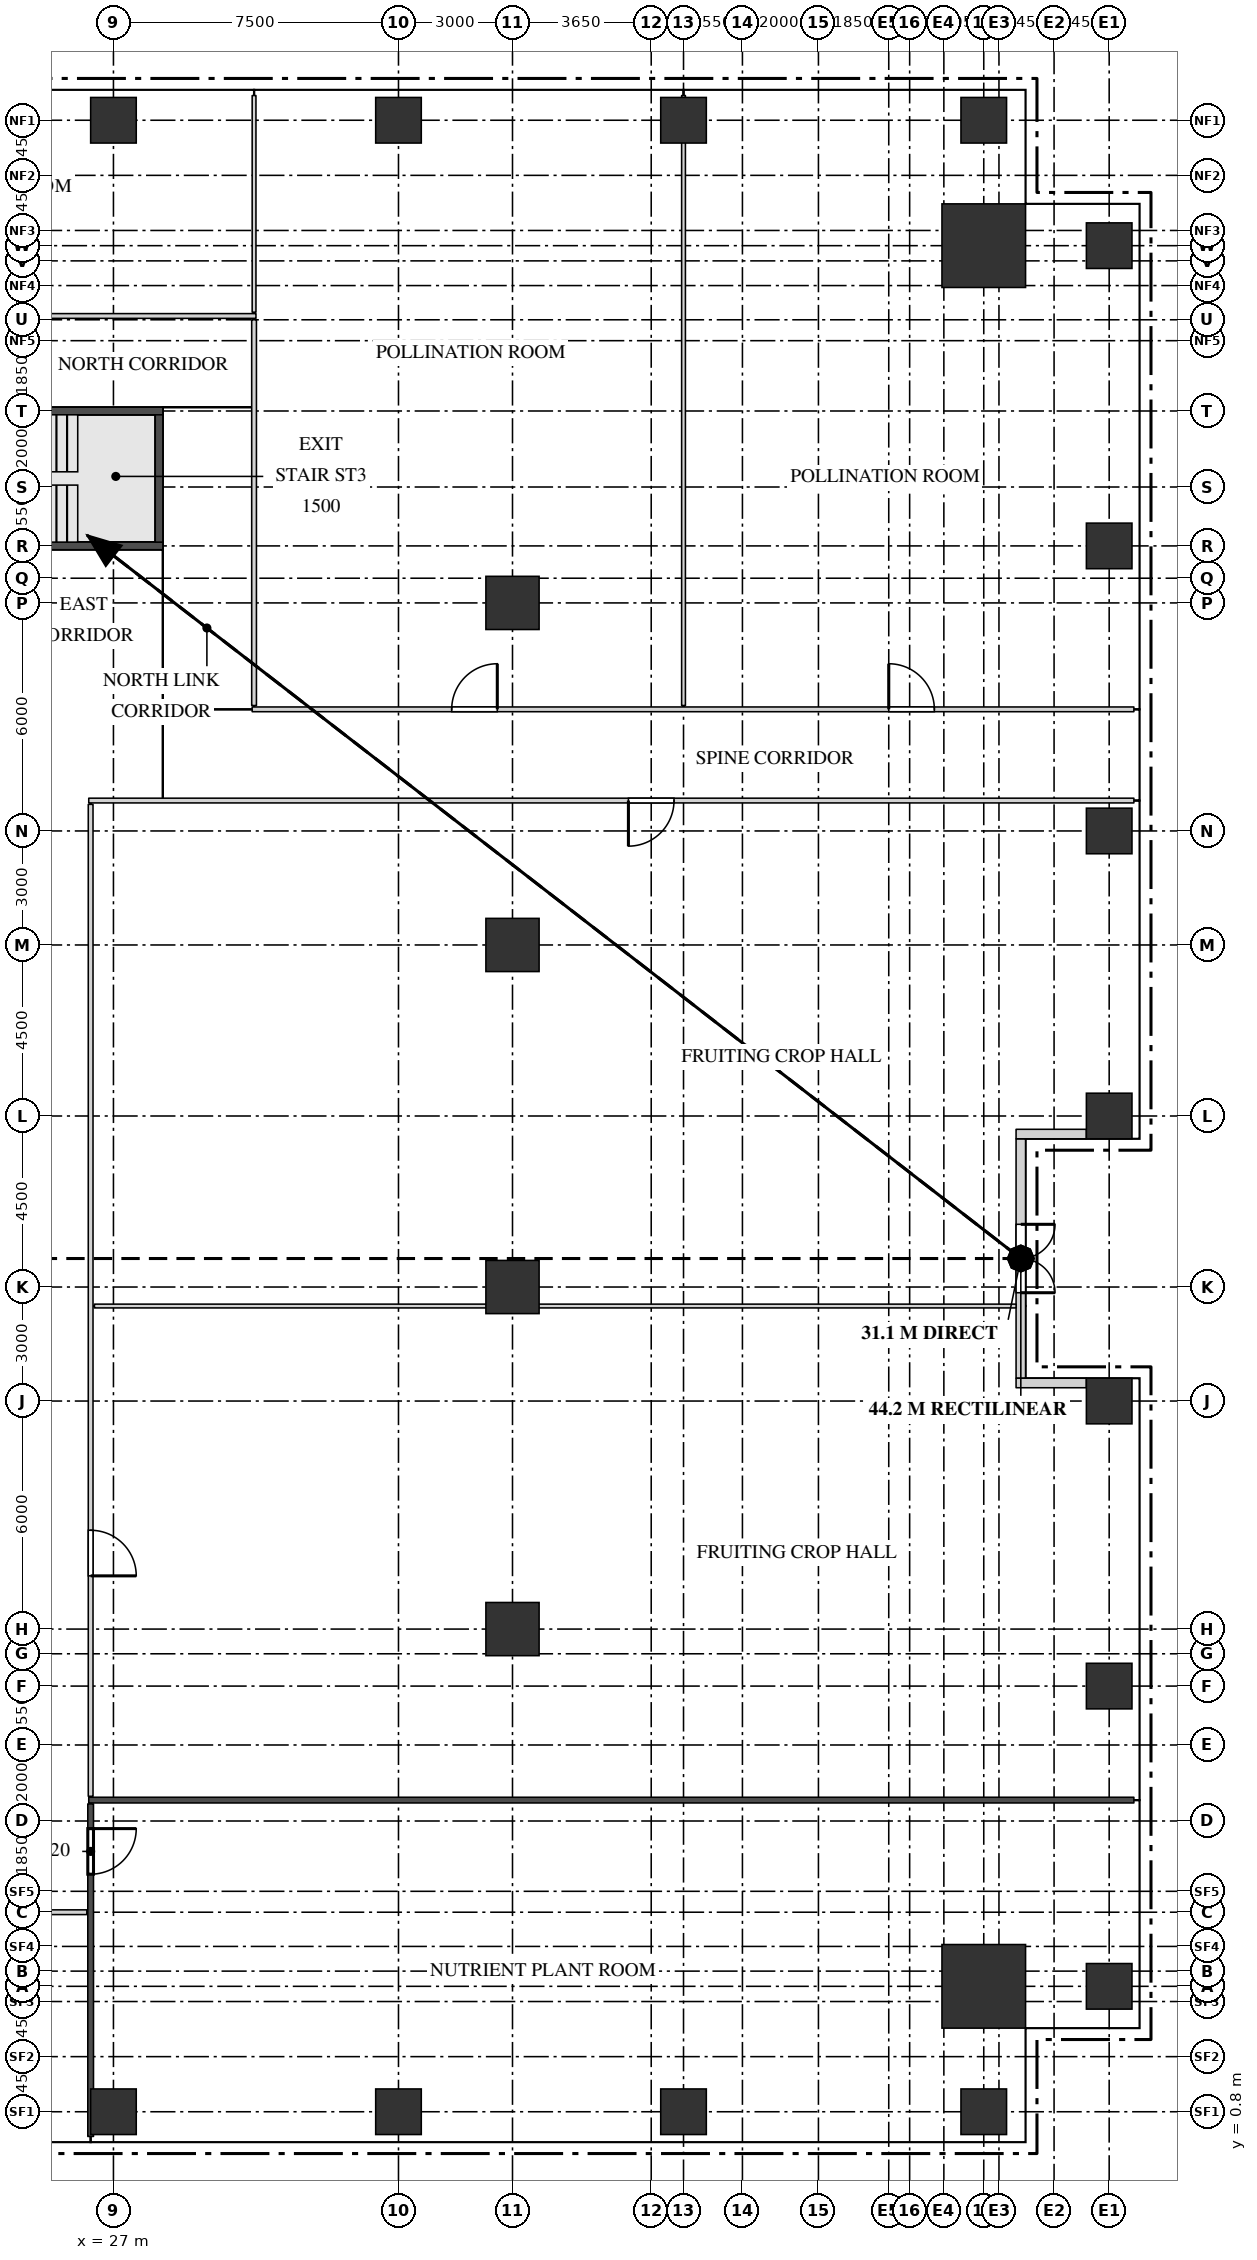
"""IFC4 building model, lengths in metres.
Left out: names, types, materials, properties, quantities, classifications, styles, units other than length and angle.
Written with IfcOpenShell. Run it as: python <this file> out.ifc"""

import sys

from ifc_helpers import new_model, si_unit, direction, frame, frame_2d, origin, origin_2d, place, context, subcontext, project, spatial, rectangle, extrude, source, transform, mapped, element, fill, save


model = new_model("IFC4")
c1 = context("Model", 3, precision=1e-05, world=origin(), true_north=direction((0.0, 1.0)))
c2 = subcontext(c1, "Body", "Model", "MODEL_VIEW")
j1 = project(units=[si_unit("LENGTHUNIT", "METRE"), si_unit("PLANEANGLEUNIT", "RADIAN")], contexts=[c1])
p1 = place(None, origin())
s1 = spatial("IfcSite", under=j1, at=p1, CompositionType="ELEMENT")
p2 = place(p1, origin())
s2 = spatial("IfcBuilding", under=s1, at=p2, CompositionType="ELEMENT")
p3 = place(p2, frame((0.0, 0.0, 73.5)))
s3 = spatial("IfcBuildingStorey", under=s2, at=p3, CompositionType="ELEMENT", Elevation=73.5)
m1 = source(origin(), c2, "Body", "SweptSolid", [
    extrude(rectangle(XDim=7.1, YDim=0.2, at=frame_2d((3.55, 0.0))), origin(), (0.0, 0.0, 1.0), 4.2),
])
p4 = place(p3, frame((21.2, 45.55, 0.0), z_axis=(0.0, 0.0, 1.0), x_axis=(1.0, 0.0, 0.0)))
e1 = element("IfcWall", 1, at=p4, inside=s3, PredefinedType="SHEAR", context=c2, shape_type="MappedRepresentation", body=[
    mapped(m1, transform((0.0, 0.0, 0.0))),
])
m2 = source(origin(), c2, "Body", "SweptSolid", [
    extrude(rectangle(XDim=1.2, YDim=2.1, at=frame_2d((0.6, 1.05))), frame((0.0, 0.11, 0.0), z_axis=(0.0, -1.0, 0.0), x_axis=(1.0, 0.0, 0.0)), (0.0, 0.0, 1.0), 0.22),
])
p5 = place(p4, frame((0.15, 0.0, 0.0)))
e2 = element("IfcOpeningElement", 2, at=p5, cuts=e1, PredefinedType="OPENING", context=c2, shape_type="MappedRepresentation", body=[
    mapped(m2, transform((0.0, 0.0, 0.0))),
])
p6 = place(p3, frame((21.2, 42.0, 0.0), z_axis=(0.0, 0.0, 1.0), x_axis=(1.0, 0.0, 0.0)))
e3 = element("IfcWall", 3, at=p6, inside=s3, PredefinedType="SHEAR", context=c2, shape_type="MappedRepresentation", body=[
    mapped(m1, transform((0.0, 0.0, 0.0))),
])
m3 = source(origin(), c2, "Body", "SweptSolid", [
    extrude(rectangle(XDim=3.35, YDim=0.2, at=frame_2d((1.675, 0.0))), origin(), (0.0, 0.0, 1.0), 4.2),
])
p7 = place(p3, frame((28.2, 42.1, 0.0), z_axis=(0.0, 0.0, 1.0), x_axis=(0.0, 1.0, 0.0)))
e4 = element("IfcWall", 4, at=p7, inside=s3, PredefinedType="SHEAR", context=c2, shape_type="MappedRepresentation", body=[
    mapped(m3, transform((0.0, 0.0, 0.0))),
])
m4 = source(origin(), c2, "Body", "SweptSolid", [
    extrude(rectangle(XDim=2.2, YDim=2.2, at=origin_2d()), origin(), (0.0, 0.0, 1.0), 4.5),
])
for number, where, z_axis, x_axis in (
    (5, (49.9, 49.9, 0.0), (0.0, 0.0, 1.0), (1.0, 0.0, 0.0)),
    (6, (49.9, 4.1, 0.0), (0.0, 0.0, 1.0), (1.0, 0.0, 0.0)),
):
    element("IfcColumn", number, at=place(p3, frame(where, z_axis=z_axis, x_axis=x_axis)), inside=s3, PredefinedType="COLUMN", context=c2, shape_type="MappedRepresentation", body=[
        mapped(m4, transform((0.0, 0.0, 0.0))),
    ])
m5 = source(origin(), c2, "Body", "SweptSolid", [
    extrude(rectangle(XDim=1.2, YDim=1.2, at=origin_2d()), origin(), (0.0, 0.0, 1.0), 4.2),
])
for number, where, z_axis, x_axis in (
    (7, (27.0, 0.8, 0.0), (0.0, 0.0, 1.0), (1.0, 0.0, 0.0)),
    (8, (34.5, 0.8, 0.0), (0.0, 0.0, 1.0), (1.0, 0.0, 0.0)),
    (9, (42.0, 0.8, 0.0), (0.0, 0.0, 1.0), (1.0, 0.0, 0.0)),
    (10, (49.9, 0.8, 0.0), (0.0, 0.0, 1.0), (1.0, 0.0, 0.0)),
    (11, (53.2, 4.1, 0.0), (0.0, 0.0, 1.0), (1.0, 0.0, 0.0)),
    (12, (53.2, 12.0, 0.0), (0.0, 0.0, 1.0), (1.0, 0.0, 0.0)),
    (13, (53.2, 19.5, 0.0), (0.0, 0.0, 1.0), (1.0, 0.0, 0.0)),
    (14, (53.2, 27.0, 0.0), (0.0, 0.0, 1.0), (1.0, 0.0, 0.0)),
    (15, (53.2, 34.5, 0.0), (0.0, 0.0, 1.0), (1.0, 0.0, 0.0)),
    (16, (53.2, 42.0, 0.0), (0.0, 0.0, 1.0), (1.0, 0.0, 0.0)),
    (17, (53.2, 49.9, 0.0), (0.0, 0.0, 1.0), (1.0, 0.0, 0.0)),
    (18, (27.0, 53.2, 0.0), (0.0, 0.0, 1.0), (1.0, 0.0, 0.0)),
    (19, (34.5, 53.2, 0.0), (0.0, 0.0, 1.0), (1.0, 0.0, 0.0)),
    (20, (42.0, 53.2, 0.0), (0.0, 0.0, 1.0), (1.0, 0.0, 0.0)),
    (21, (49.9, 53.2, 0.0), (0.0, 0.0, 1.0), (1.0, 0.0, 0.0)),
):
    element("IfcColumn", number, at=place(p3, frame(where, z_axis=z_axis, x_axis=x_axis)), inside=s3, PredefinedType="COLUMN", context=c2, shape_type="MappedRepresentation", body=[
        mapped(m5, transform((0.0, 0.0, 0.0))),
    ])
m6 = source(origin(), c2, "Body", "SweptSolid", [
    extrude(rectangle(XDim=1.4, YDim=1.4, at=origin_2d()), origin(), (0.0, 0.0, 1.0), 4.2),
])
for number, where, z_axis, x_axis in (
    (22, (37.5, 13.5, 0.0), (0.0, 0.0, 1.0), (1.0, 0.0, 0.0)),
    (23, (37.5, 22.5, 0.0), (0.0, 0.0, 1.0), (1.0, 0.0, 0.0)),
    (24, (37.5, 31.5, 0.0), (0.0, 0.0, 1.0), (1.0, 0.0, 0.0)),
    (25, (37.5, 40.5, 0.0), (0.0, 0.0, 1.0), (1.0, 0.0, 0.0)),
):
    element("IfcColumn", number, at=place(p3, frame(where, z_axis=z_axis, x_axis=x_axis)), inside=s3, PredefinedType="COLUMN", context=c2, shape_type="MappedRepresentation", body=[
        mapped(m6, transform((0.0, 0.0, 0.0))),
    ])
m7 = source(origin(), c2, "Body", "SweptSolid", [
    extrude(rectangle(XDim=6.3, YDim=0.25, at=frame_2d((3.15, 0.0))), origin(), (0.0, 0.0, 1.0), 3.6),
])
p8 = place(p3, frame((50.875, 20.1, 0.0), z_axis=(0.0, 0.0, 1.0), x_axis=(0.0, 1.0, 0.0)))
e26 = element("IfcWall", 26, at=p8, inside=s3, PredefinedType="SOLIDWALL", context=c2, shape_type="MappedRepresentation", body=[
    mapped(m7, transform((0.0, 0.0, 0.0))),
])
m8 = source(origin(), c2, "Body", "SweptSolid", [
    extrude(rectangle(XDim=1.6, YDim=2.4, at=frame_2d((0.8, 1.2))), frame((0.0, 0.135, 0.0), z_axis=(0.0, -1.0, 0.0), x_axis=(1.0, 0.0, 0.0)), (0.0, 0.0, 1.0), 0.27),
])
p9 = place(p8, frame((0.35, 0.0, 0.0)))
e27 = element("IfcOpeningElement", 27, at=p9, cuts=e26, PredefinedType="OPENING", context=c2, shape_type="MappedRepresentation", body=[
    mapped(m8, transform((0.0, 0.0, 0.0))),
])
p10 = place(p8, frame((4.35, 0.0, 0.0)))
e28 = element("IfcOpeningElement", 28, at=p10, cuts=e26, PredefinedType="OPENING", context=c2, shape_type="MappedRepresentation", body=[
    mapped(m8, transform((0.0, 0.0, 0.0))),
])
m9 = source(origin(), c2, "Body", "SweptSolid", [
    extrude(rectangle(XDim=1.8, YDim=2.4, at=frame_2d((0.9, 1.2))), frame((0.0, 0.135, 0.0), z_axis=(0.0, -1.0, 0.0), x_axis=(1.0, 0.0, 0.0)), (0.0, 0.0, 1.0), 0.27),
])
p11 = place(p8, frame((2.25, 0.0, 0.0)))
e29 = element("IfcOpeningElement", 29, at=p11, cuts=e26, PredefinedType="OPENING", context=c2, shape_type="MappedRepresentation", body=[
    mapped(m9, transform((0.0, 0.0, 0.0))),
])
m10 = source(origin(), c2, "Body", "SweptSolid", [
    extrude(rectangle(XDim=1.85, YDim=0.25, at=frame_2d((0.925, 0.0))), origin(), (0.0, 0.0, 1.0), 3.6),
])
for number, where, z_axis, x_axis in (
    (30, (52.6, 19.975, 0.0), (0.0, 0.0, 1.0), (-1.0, 0.0, 0.0)),
    (31, (52.6, 26.525, 0.0), (0.0, 0.0, 1.0), (-1.0, 0.0, 0.0)),
):
    element("IfcWall", number, at=place(p3, frame(where, z_axis=z_axis, x_axis=x_axis)), inside=s3, PredefinedType="SOLIDWALL", context=c2, shape_type="MappedRepresentation", body=[
        mapped(m10, transform((0.0, 0.0, 0.0))),
    ])
m11 = source(origin(), c2, "Body", "SweptSolid", [
    extrude(rectangle(XDim=8.75, YDim=0.15, at=frame_2d((4.375, 0.0))), origin(), (0.0, 0.0, 1.0), 4.3),
])
p12 = place(p3, frame((26.4, 0.15, 0.0), z_axis=(0.0, 0.0, 1.0), x_axis=(0.0, 1.0, 0.0)))
e32 = element("IfcWall", 32, at=p12, inside=s3, PredefinedType="PARTITIONING", context=c2, shape_type="MappedRepresentation", body=[
    mapped(m11, transform((0.0, 0.0, 0.0))),
])
m12 = source(origin(), c2, "Body", "SweptSolid", [
    extrude(rectangle(XDim=1.2, YDim=2.1, at=frame_2d((0.6, 1.05))), frame((0.0, 0.085, 0.0), z_axis=(0.0, -1.0, 0.0), x_axis=(1.0, 0.0, 0.0)), (0.0, 0.0, 1.0), 0.17),
])
p13 = place(p12, frame((6.9, 0.0, 0.0)))
e33 = element("IfcOpeningElement", 33, at=p13, cuts=e32, PredefinedType="OPENING", context=c2, shape_type="MappedRepresentation", body=[
    mapped(m12, transform((0.0, 0.0, 0.0))),
])
m13 = source(origin(), c2, "Body", "SweptSolid", [
    extrude(rectangle(XDim=22.15, YDim=0.125, at=frame_2d((11.075, 0.0))), origin(), (0.0, 0.0, 1.0), 4.3),
])
p14 = place(p3, frame((4.15, 6.05, 0.0), z_axis=(0.0, 0.0, 1.0), x_axis=(1.0, 0.0, 0.0)))
e34 = element("IfcWall", 34, at=p14, inside=s3, PredefinedType="PARTITIONING", context=c2, shape_type="MappedRepresentation", body=[
    mapped(m13, transform((0.0, 0.0, 0.0))),
])
m14 = source(origin(), c2, "Body", "SweptSolid", [
    extrude(rectangle(XDim=1.2, YDim=2.1, at=frame_2d((0.6, 1.05))), frame((0.0, 0.073, 0.0), z_axis=(0.0, -1.0, 0.0), x_axis=(1.0, 0.0, 0.0)), (0.0, 0.0, 1.0), 0.145),
])
p15 = place(p14, frame((9.2, 0.0, 0.0)))
e35 = element("IfcOpeningElement", 35, at=p15, cuts=e34, PredefinedType="OPENING", context=c2, shape_type="MappedRepresentation", body=[
    mapped(m14, transform((0.0, 0.0, 0.0))),
])
m15 = source(origin(), c2, "Body", "SweptSolid", [
    extrude(rectangle(XDim=27.5, YDim=0.15, at=frame_2d((13.75, 0.0))), origin(), (0.0, 0.0, 1.0), 4.3),
])
p16 = place(p3, frame((26.35, 9.0, 0.0), z_axis=(0.0, 0.0, 1.0), x_axis=(1.0, 0.0, 0.0)))
e36 = element("IfcWall", 36, at=p16, inside=s3, PredefinedType="PARTITIONING", context=c2, shape_type="MappedRepresentation", body=[
    mapped(m15, transform((0.0, 0.0, 0.0))),
])
m16 = source(origin(), c2, "Body", "SweptSolid", [
    extrude(rectangle(XDim=26.1, YDim=0.125, at=frame_2d((13.05, 0.0))), origin(), (0.0, 0.0, 1.0), 4.3),
])
p17 = place(p3, frame((26.4, 9.1, 0.0), z_axis=(0.0, 0.0, 1.0), x_axis=(0.0, 1.0, 0.0)))
e37 = element("IfcWall", 37, at=p17, inside=s3, PredefinedType="PARTITIONING", context=c2, shape_type="MappedRepresentation", body=[
    mapped(m16, transform((0.0, 0.0, 0.0))),
])
p18 = place(p17, frame((5.8, 0.0, 0.0)))
e38 = element("IfcOpeningElement", 38, at=p18, cuts=e37, PredefinedType="OPENING", context=c2, shape_type="MappedRepresentation", body=[
    mapped(m14, transform((0.0, 0.0, 0.0))),
])
m17 = source(origin(), c2, "Body", "SweptSolid", [
    extrude(rectangle(XDim=24.25, YDim=0.1, at=frame_2d((12.125, 0.0))), origin(), (0.0, 0.0, 1.0), 4.3),
])
p19 = place(p3, frame((26.5, 22.0, 0.0), z_axis=(0.0, 0.0, 1.0), x_axis=(1.0, 0.0, 0.0)))
e39 = element("IfcWall", 39, at=p19, inside=s3, PredefinedType="PARTITIONING", context=c2, shape_type="MappedRepresentation", body=[
    mapped(m17, transform((0.0, 0.0, 0.0))),
])
m18 = source(origin(), c2, "Body", "SweptSolid", [
    extrude(rectangle(XDim=27.5, YDim=0.125, at=frame_2d((13.75, 0.0))), origin(), (0.0, 0.0, 1.0), 4.3),
])
p20 = place(p3, frame((26.35, 35.3, 0.0), z_axis=(0.0, 0.0, 1.0), x_axis=(1.0, 0.0, 0.0)))
e40 = element("IfcWall", 40, at=p20, inside=s3, PredefinedType="PARTITIONING", context=c2, shape_type="MappedRepresentation", body=[
    mapped(m18, transform((0.0, 0.0, 0.0))),
])
p21 = place(p20, frame((14.2, 0.0, 0.0)))
e41 = element("IfcOpeningElement", 41, at=p21, cuts=e40, PredefinedType="OPENING", context=c2, shape_type="MappedRepresentation", body=[
    mapped(m14, transform((0.0, 0.0, 0.0))),
])
m19 = source(origin(), c2, "Body", "SweptSolid", [
    extrude(rectangle(XDim=23.2, YDim=0.125, at=frame_2d((11.6, 0.0))), origin(), (0.0, 0.0, 1.0), 4.3),
])
p22 = place(p3, frame((30.65, 37.7, 0.0), z_axis=(0.0, 0.0, 1.0), x_axis=(1.0, 0.0, 0.0)))
e42 = element("IfcWall", 42, at=p22, inside=s3, PredefinedType="PARTITIONING", context=c2, shape_type="MappedRepresentation", body=[
    mapped(m19, transform((0.0, 0.0, 0.0))),
])
p23 = place(p22, frame((5.25, 0.0, 0.0)))
e43 = element("IfcOpeningElement", 43, at=p23, cuts=e42, PredefinedType="OPENING", context=c2, shape_type="MappedRepresentation", body=[
    mapped(m14, transform((0.0, 0.0, 0.0))),
])
p24 = place(p22, frame((16.75, 0.0, 0.0)))
e44 = element("IfcOpeningElement", 44, at=p24, cuts=e42, PredefinedType="OPENING", context=c2, shape_type="MappedRepresentation", body=[
    mapped(m14, transform((0.0, 0.0, 0.0))),
])
m20 = source(origin(), c2, "Body", "SweptSolid", [
    extrude(rectangle(XDim=10.15, YDim=0.125, at=frame_2d((5.075, 0.0))), origin(), (0.0, 0.0, 1.0), 4.3),
])
p25 = place(p3, frame((30.7, 37.8, 0.0), z_axis=(0.0, 0.0, 1.0), x_axis=(0.0, 1.0, 0.0)))
e45 = element("IfcWall", 45, at=p25, inside=s3, PredefinedType="PARTITIONING", context=c2, shape_type="MappedRepresentation", body=[
    mapped(m20, transform((0.0, 0.0, 0.0))),
])
m21 = source(origin(), c2, "Body", "SweptSolid", [
    extrude(rectangle(XDim=16.05, YDim=0.1, at=frame_2d((8.025, 0.0))), origin(), (0.0, 0.0, 1.0), 3.7),
])
p26 = place(p3, frame((42.0, 37.8, 0.0), z_axis=(0.0, 0.0, 1.0), x_axis=(0.0, 1.0, 0.0)))
e46 = element("IfcWall", 46, at=p26, inside=s3, PredefinedType="PARTITIONING", context=c2, shape_type="MappedRepresentation", body=[
    mapped(m21, transform((0.0, 0.0, 0.0))),
])
m22 = source(origin(), c2, "Body", "SweptSolid", [
    extrude(rectangle(XDim=18.8, YDim=0.125, at=frame_2d((9.4, 0.0))), origin(), (0.0, 0.0, 1.0), 4.3),
])
p27 = place(p3, frame((11.95, 48.05, 0.0), z_axis=(0.0, 0.0, 1.0), x_axis=(1.0, 0.0, 0.0)))
e47 = element("IfcWall", 47, at=p27, inside=s3, PredefinedType="PARTITIONING", context=c2, shape_type="MappedRepresentation", body=[
    mapped(m22, transform((0.0, 0.0, 0.0))),
])
p28 = place(p27, frame((8.8, 0.0, 0.0)))
e48 = element("IfcOpeningElement", 48, at=p28, cuts=e47, PredefinedType="OPENING", context=c2, shape_type="MappedRepresentation", body=[
    mapped(m14, transform((0.0, 0.0, 0.0))),
])
m23 = source(origin(), c2, "Body", "SweptSolid", [
    extrude(rectangle(XDim=5.7, YDim=0.1, at=frame_2d((2.85, 0.0))), origin(), (0.0, 0.0, 1.0), 4.3),
])
p29 = place(p3, frame((30.7, 48.15, 0.0), z_axis=(0.0, 0.0, 1.0), x_axis=(0.0, 1.0, 0.0)))
e49 = element("IfcWall", 49, at=p29, inside=s3, PredefinedType="PARTITIONING", context=c2, shape_type="MappedRepresentation", body=[
    mapped(m23, transform((0.0, 0.0, 0.0))),
])
m24 = source(origin(), c2, "Body", "SweptSolid", [
    extrude(rectangle(XDim=1.6, YDim=2.4, at=frame_2d((0.8, 1.2))), frame((0.0, 0.03, 0.0), z_axis=(0.0, -1.0, 0.0), x_axis=(1.0, 0.0, 0.0)), (0.0, 0.0, 1.0), 0.06),
])
p30 = place(p9, origin())
e50 = element("IfcWindow", 50, at=p30, inside=s3, PartitioningType="SINGLE_PANEL", PredefinedType="WINDOW", context=c2, shape_type="MappedRepresentation", body=[
    mapped(m24, transform((0.0, 0.0, 0.0))),
])
fill(e27, e50)
p31 = place(p10, origin())
e51 = element("IfcWindow", 51, at=p31, inside=s3, PartitioningType="SINGLE_PANEL", PredefinedType="WINDOW", context=c2, shape_type="MappedRepresentation", body=[
    mapped(m24, transform((0.0, 0.0, 0.0))),
])
fill(e28, e51)
m25 = source(origin(), c2, "Body", "SweptSolid", [
    extrude(rectangle(XDim=1.8, YDim=2.4, at=frame_2d((0.9, 1.2))), frame((0.0, 0.025, 0.0), z_axis=(0.0, -1.0, 0.0), x_axis=(1.0, 0.0, 0.0)), (0.0, 0.0, 1.0), 0.05),
])
p32 = place(p11, origin())
e52 = element("IfcDoor", 52, at=p32, inside=s3, OperationType="DOUBLE_DOOR_DOUBLE_SWING", PredefinedType="DOOR", context=c2, shape_type="MappedRepresentation", body=[
    mapped(m25, transform((0.0, 0.0, 0.0))),
])
fill(e29, e52)
m26 = source(origin(), c2, "Body", "SweptSolid", [
    extrude(rectangle(XDim=1.2, YDim=2.1, at=frame_2d((0.6, 1.05))), frame((0.0, 0.025, 0.0), z_axis=(0.0, -1.0, 0.0), x_axis=(1.0, 0.0, 0.0)), (0.0, 0.0, 1.0), 0.05),
])
p33 = place(p13, origin())
e53 = element("IfcDoor", 53, at=p33, inside=s3, OperationType="SINGLE_SWING_RIGHT", PredefinedType="DOOR", context=c2, shape_type="MappedRepresentation", body=[
    mapped(m26, transform((0.0, 0.0, 0.0))),
])
fill(e33, e53)
p34 = place(p18, origin())
e54 = element("IfcDoor", 54, at=p34, inside=s3, OperationType="SINGLE_SWING_LEFT", PredefinedType="DOOR", context=c2, shape_type="MappedRepresentation", body=[
    mapped(m26, transform((0.0, 0.0, 0.0))),
])
fill(e38, e54)
p35 = place(p21, origin())
e55 = element("IfcDoor", 55, at=p35, inside=s3, OperationType="SINGLE_SWING_LEFT", PredefinedType="DOOR", context=c2, shape_type="MappedRepresentation", body=[
    mapped(m26, transform((0.0, 0.0, 0.0))),
])
fill(e41, e55)
p36 = place(p23, origin())
e56 = element("IfcDoor", 56, at=p36, inside=s3, OperationType="SINGLE_SWING_LEFT", PredefinedType="DOOR", context=c2, shape_type="MappedRepresentation", body=[
    mapped(m26, transform((0.0, 0.0, 0.0))),
])
fill(e43, e56)
p37 = place(p24, origin())
e57 = element("IfcDoor", 57, at=p37, inside=s3, OperationType="SINGLE_SWING_RIGHT", PredefinedType="DOOR", context=c2, shape_type="MappedRepresentation", body=[
    mapped(m26, transform((0.0, 0.0, 0.0))),
])
fill(e44, e57)
save(model, sys.argv[1])
